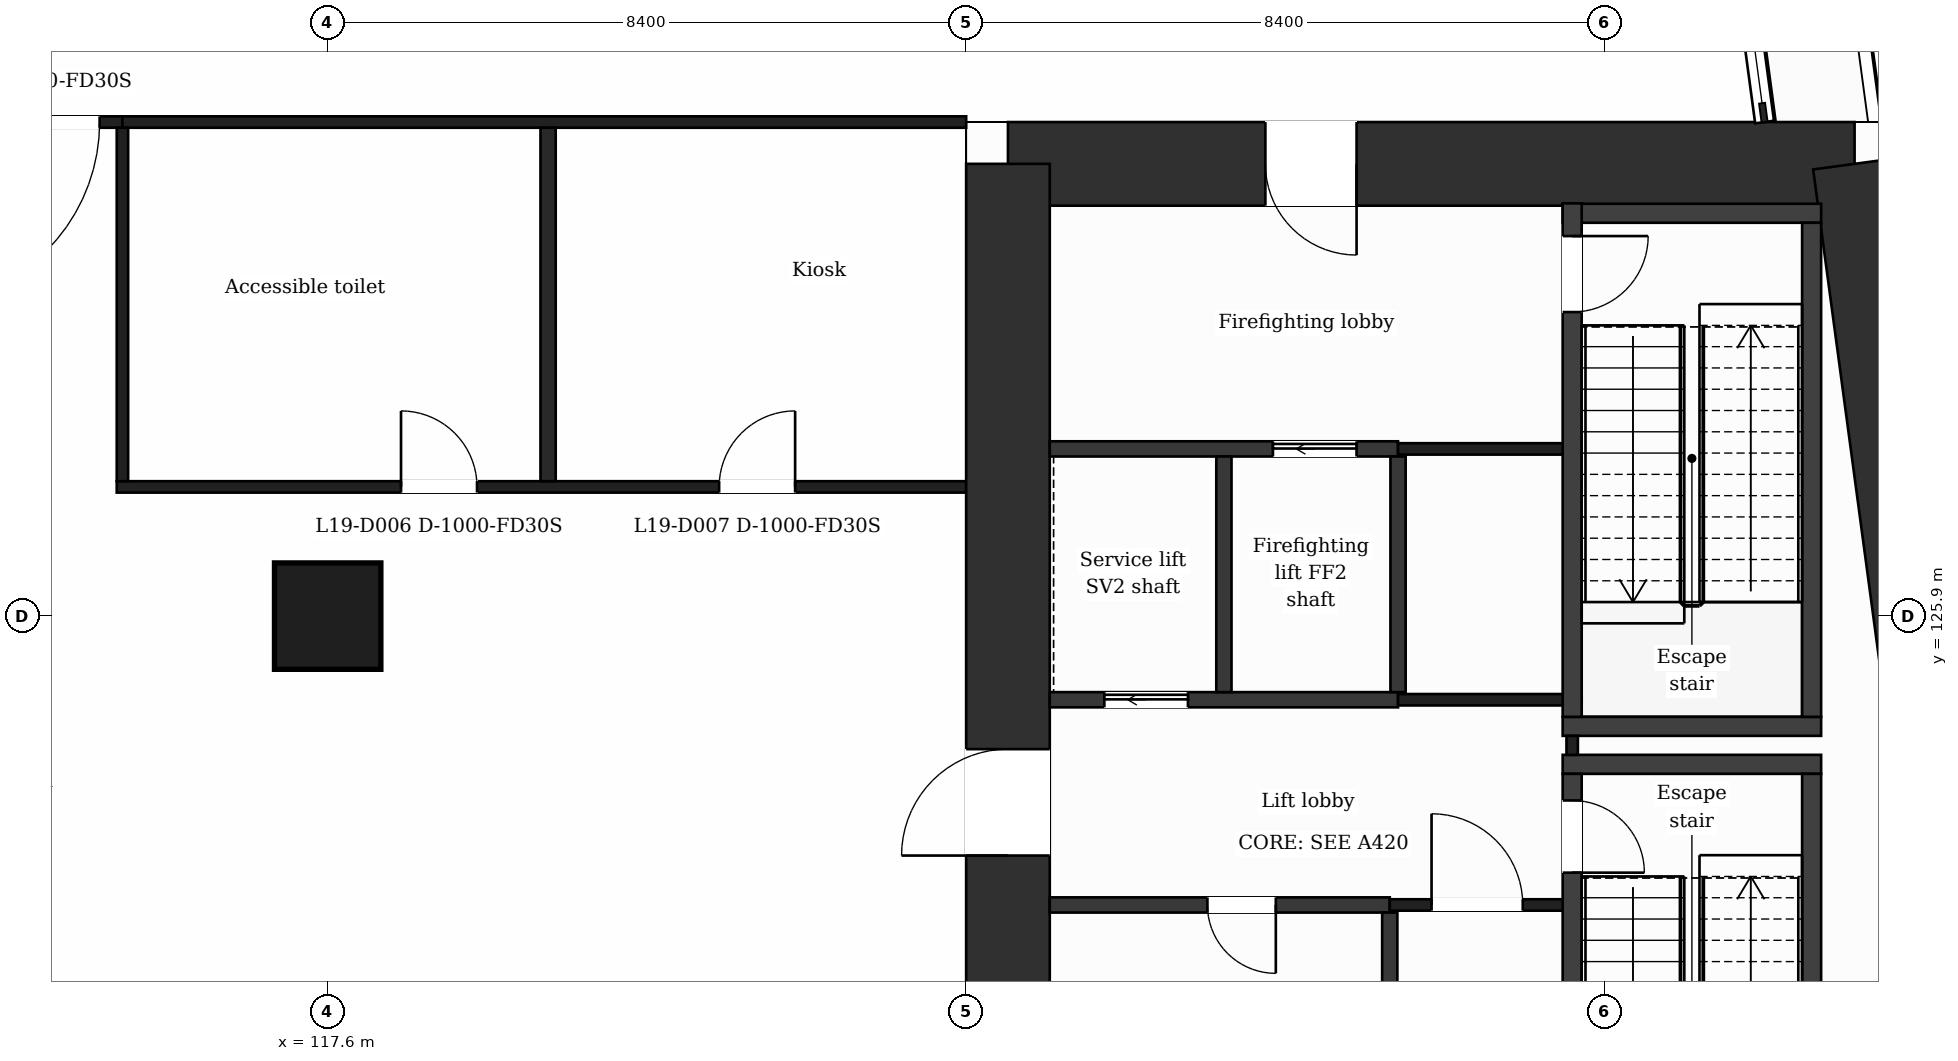
"""IFC4 building model, lengths in metres.
Left out: names, types, materials, properties, quantities, classifications, styles, units other than length and angle.
Written with IfcOpenShell. Run it as: python <this file> out.ifc"""

import sys

from ifc_helpers import new_model, si_unit, direction, frame, frame_2d, origin, origin_2d, place, context, subcontext, project, spatial, rectangle, extrude, element, fill, save


model = new_model("IFC4")
c1 = context("Model", 3, precision=1e-05, world=origin(), true_north=direction((0.0, 1.0)))
c2 = subcontext(c1, "Body", "Model", "MODEL_VIEW")
j1 = project(units=[si_unit("LENGTHUNIT", "METRE"), si_unit("PLANEANGLEUNIT", "RADIAN")], contexts=[c1])
p1 = place(None, origin())
s1 = spatial("IfcSite", under=j1, at=p1, CompositionType="ELEMENT")
p2 = place(p1, origin())
s2 = spatial("IfcBuilding", under=s1, at=p2, CompositionType="ELEMENT")
p3 = place(p2, frame((0.0, 0.0, 86.0)))
s3 = spatial("IfcBuildingStorey", under=s2, at=p3, CompositionType="ELEMENT", Elevation=86.0)
p4 = place(p3, frame((126.55, 131.85, 0.0), z_axis=(0.0, 0.0, 1.0), x_axis=(1.0, 0.0, 0.0)))
e1 = element("IfcWall", 1, at=p4, inside=s3, PredefinedType="SHEAR", context=c2, shape_type="SweptSolid", body=[
    extrude(rectangle(XDim=11.138, YDim=1.1, at=frame_2d((5.569, 0.0))), origin(), (0.0, 0.0, 1.0), 5.0),
])
p5 = place(p4, frame((3.386, 0.0, 0.0)))
e2 = element("IfcOpeningElement", 2, at=p5, cuts=e1, PredefinedType="OPENING", context=c2, shape_type="SweptSolid", body=[
    extrude(rectangle(XDim=1.2, YDim=2.1, at=frame_2d((0.6, 1.05))), frame((0.0, 0.56, 0.0), z_axis=(0.0, -1.0, 0.0), x_axis=(1.0, 0.0, 0.0)), (0.0, 0.0, 1.0), 1.12),
])
p6 = place(p3, frame((137.688, 131.85, 0.0), z_axis=(0.0, 0.0, 1.0), x_axis=(0.133411793472, -0.991060691059, 0.0)))
e3 = element("IfcWall", 3, at=p6, inside=s3, PredefinedType="SHEAR", context=c2, shape_type="SweptSolid", body=[
    extrude(rectangle(XDim=21.089, YDim=1.1, at=frame_2d((10.544, 0.0))), origin(), (0.0, 0.0, 1.0), 5.0),
])
p7 = place(p3, frame((126.55, 110.95, 0.0), z_axis=(0.0, 0.0, 1.0), x_axis=(0.0, 1.0, 0.0)))
e4 = element("IfcWall", 4, at=p7, inside=s3, PredefinedType="SHEAR", context=c2, shape_type="SweptSolid", body=[
    extrude(rectangle(XDim=20.9, YDim=1.1, at=frame_2d((10.45, 0.0))), origin(), (0.0, 0.0, 1.0), 5.0),
])
p8 = place(p7, frame((11.8, 0.0, 0.0)))
e5 = element("IfcOpeningElement", 5, at=p8, cuts=e4, PredefinedType="OPENING", context=c2, shape_type="SweptSolid", body=[
    extrude(rectangle(XDim=1.4, YDim=2.1, at=frame_2d((0.7, 1.05))), frame((0.0, 0.56, 0.0), z_axis=(0.0, -1.0, 0.0), x_axis=(1.0, 0.0, 0.0)), (0.0, 0.0, 1.0), 1.12),
])
p9 = place(p3, frame((117.6, 125.9, 0.0), z_axis=(0.0, 0.0, 1.0), x_axis=(1.0, 0.0, 0.0)))
e6 = element("IfcColumn", 6, at=p9, inside=s3, PredefinedType="COLUMN", context=c2, shape_type="SweptSolid", body=[
    extrude(rectangle(XDim=1.4, YDim=1.4, at=origin_2d()), origin(), (0.0, 0.0, 1.0), 5.0),
])
p10 = place(p3, frame((127.1, 122.1, 0.0), z_axis=(0.0, 0.0, 1.0), x_axis=(1.0, 0.0, 0.0)))
e7 = element("IfcWall", 7, at=p10, inside=s3, PredefinedType="PARTITIONING", context=c2, shape_type="SweptSolid", body=[
    extrude(rectangle(XDim=4.473, YDim=0.2, at=frame_2d((2.236, 0.0))), origin(), (0.0, 0.0, 1.0), 4.68),
])
p11 = place(p10, frame((2.074, 0.0, 0.0)))
e8 = element("IfcOpeningElement", 8, at=p11, cuts=e7, PredefinedType="OPENING", context=c2, shape_type="SweptSolid", body=[
    extrude(rectangle(XDim=0.9, YDim=2.1, at=frame_2d((0.45, 1.05))), frame((0.0, 0.11, 0.0), z_axis=(0.0, -1.0, 0.0), x_axis=(1.0, 0.0, 0.0)), (0.0, 0.0, 1.0), 0.22),
])
p12 = place(p3, frame((131.573, 122.1, 0.0), z_axis=(0.0, 0.0, 1.0), x_axis=(1.0, 0.0, 0.0)))
e9 = element("IfcWall", 9, at=p12, inside=s3, PredefinedType="PARTITIONING", context=c2, shape_type="SweptSolid", body=[
    extrude(rectangle(XDim=2.4, YDim=0.15, at=frame_2d((1.2, 0.0))), origin(), (0.0, 0.0, 1.0), 4.68),
])
p13 = place(p12, frame((0.55, 0.0, 0.0)))
e10 = element("IfcOpeningElement", 10, at=p13, cuts=e9, PredefinedType="OPENING", context=c2, shape_type="SweptSolid", body=[
    extrude(rectangle(XDim=1.2, YDim=2.1, at=frame_2d((0.6, 1.05))), frame((0.0, 0.085, 0.0), z_axis=(0.0, -1.0, 0.0), x_axis=(1.0, 0.0, 0.0)), (0.0, 0.0, 1.0), 0.17),
])
for number, where, z_axis, x_axis in (
    (11, (133.848, 123.95, 0.0), (0.0, 0.0, 1.0), (1.0, 0.0, 0.0)),
    (12, (133.848, 124.45, 0.0), (0.0, 0.0, 1.0), (1.0, 0.0, 0.0)),
):
    element("IfcWall", number, at=place(p3, frame(where, z_axis=z_axis, x_axis=x_axis)), inside=s3, PredefinedType="PARTITIONING", context=c2, shape_type="SweptSolid", body=[
        extrude(rectangle(XDim=3.4, YDim=0.25, at=frame_2d((1.7, 0.0))), origin(), (0.0, 0.0, 1.0), 4.68),
    ])
p14 = place(p3, frame((127.1, 124.8, 0.0), z_axis=(0.0, 0.0, 1.0), x_axis=(1.0, 0.0, 0.0)))
e13 = element("IfcWall", 13, at=p14, inside=s3, PredefinedType="PARTITIONING", context=c2, shape_type="SweptSolid", body=[
    extrude(rectangle(XDim=4.582, YDim=0.2, at=frame_2d((2.291, 0.0))), origin(), (0.0, 0.0, 1.0), 4.68),
])
p15 = place(p14, frame((0.718, 0.0, 0.0)))
e14 = element("IfcOpeningElement", 14, at=p15, cuts=e13, PredefinedType="OPENING", context=c2, shape_type="SweptSolid", body=[
    extrude(rectangle(XDim=1.1, YDim=2.1, at=frame_2d((0.55, 1.05))), frame((0.0, 0.11, 0.0), z_axis=(0.0, -1.0, 0.0), x_axis=(1.0, 0.0, 0.0)), (0.0, 0.0, 1.0), 0.22),
])
p16 = place(p3, frame((131.682, 124.8, 0.0), z_axis=(0.0, 0.0, 1.0), x_axis=(1.0, 0.0, 0.0)))
e15 = element("IfcWall", 15, at=p16, inside=s3, PredefinedType="PARTITIONING", context=c2, shape_type="SweptSolid", body=[
    extrude(rectangle(XDim=2.416, YDim=0.15, at=frame_2d((1.208, 0.0))), origin(), (0.0, 0.0, 1.0), 4.68),
])
p17 = place(p3, frame((114.825, 127.6, 0.0), z_axis=(0.0, 0.0, 1.0), x_axis=(1.0, 0.0, 0.0)))
e16 = element("IfcWall", 16, at=p17, inside=s3, PredefinedType="PARTITIONING", context=c2, shape_type="SweptSolid", body=[
    extrude(rectangle(XDim=11.175, YDim=0.15, at=frame_2d((5.587, 0.0))), origin(), (0.0, 0.0, 1.0), 4.68),
])
p18 = place(p17, frame((3.74, 0.0, 0.0)))
e17 = element("IfcOpeningElement", 17, at=p18, cuts=e16, PredefinedType="OPENING", context=c2, shape_type="SweptSolid", body=[
    extrude(rectangle(XDim=1.0, YDim=2.1, at=frame_2d((0.5, 1.05))), frame((0.0, 0.085, 0.0), z_axis=(0.0, -1.0, 0.0), x_axis=(1.0, 0.0, 0.0)), (0.0, 0.0, 1.0), 0.17),
])
p19 = place(p17, frame((7.925, 0.0, 0.0)))
e18 = element("IfcOpeningElement", 18, at=p19, cuts=e16, PredefinedType="OPENING", context=c2, shape_type="SweptSolid", body=[
    extrude(rectangle(XDim=1.0, YDim=2.1, at=frame_2d((0.5, 1.05))), frame((0.0, 0.085, 0.0), z_axis=(0.0, -1.0, 0.0), x_axis=(1.0, 0.0, 0.0)), (0.0, 0.0, 1.0), 0.17),
])
p20 = place(p3, frame((127.1, 128.1, 0.0), z_axis=(0.0, 0.0, 1.0), x_axis=(1.0, 0.0, 0.0)))
e19 = element("IfcWall", 19, at=p20, inside=s3, PredefinedType="PARTITIONING", context=c2, shape_type="SweptSolid", body=[
    extrude(rectangle(XDim=4.582, YDim=0.2, at=frame_2d((2.291, 0.0))), origin(), (0.0, 0.0, 1.0), 4.68),
])
p21 = place(p20, frame((2.936, 0.0, 0.0)))
e20 = element("IfcOpeningElement", 20, at=p21, cuts=e19, PredefinedType="OPENING", context=c2, shape_type="SweptSolid", body=[
    extrude(rectangle(XDim=1.1, YDim=2.1, at=frame_2d((0.55, 1.05))), frame((0.0, 0.11, 0.0), z_axis=(0.0, -1.0, 0.0), x_axis=(1.0, 0.0, 0.0)), (0.0, 0.0, 1.0), 0.22),
])
p22 = place(p3, frame((131.682, 128.1, 0.0), z_axis=(0.0, 0.0, 1.0), x_axis=(1.0, 0.0, 0.0)))
e21 = element("IfcWall", 21, at=p22, inside=s3, PredefinedType="PARTITIONING", context=c2, shape_type="SweptSolid", body=[
    extrude(rectangle(XDim=2.291, YDim=0.15, at=frame_2d((1.146, 0.0))), origin(), (0.0, 0.0, 1.0), 4.68),
])
p23 = place(p3, frame((133.848, 131.2, 0.0), z_axis=(0.0, 0.0, 1.0), x_axis=(1.0, 0.0, 0.0)))
e22 = element("IfcWall", 22, at=p23, inside=s3, PredefinedType="PARTITIONING", context=c2, shape_type="SweptSolid", body=[
    extrude(rectangle(XDim=3.4, YDim=0.25, at=frame_2d((1.7, 0.0))), origin(), (0.0, 0.0, 1.0), 4.68),
])
p24 = place(p3, frame((111.9, 132.4, 0.0), z_axis=(0.0, 0.0, 1.0), x_axis=(1.0, 0.0, 0.0)))
e23 = element("IfcWall", 23, at=p24, inside=s3, PredefinedType="PARTITIONING", context=c2, shape_type="SweptSolid", body=[
    extrude(rectangle(XDim=3.0, YDim=0.15, at=frame_2d((1.5, 0.0))), origin(), (0.0, 0.0, 1.0), 4.68),
])
p25 = place(p24, frame((0.3, 0.0, 0.0)))
e24 = element("IfcOpeningElement", 24, at=p25, cuts=e23, PredefinedType="OPENING", context=c2, shape_type="SweptSolid", body=[
    extrude(rectangle(XDim=2.4, YDim=2.1, at=frame_2d((1.2, 1.05))), frame((0.0, 0.085, 0.0), z_axis=(0.0, -1.0, 0.0), x_axis=(1.0, 0.0, 0.0)), (0.0, 0.0, 1.0), 0.17),
])
p26 = place(p3, frame((114.9, 132.4, 0.0), z_axis=(0.0, 0.0, 1.0), x_axis=(1.0, 0.0, 0.0)))
e25 = element("IfcWall", 25, at=p26, inside=s3, PredefinedType="PARTITIONING", context=c2, shape_type="SweptSolid", body=[
    extrude(rectangle(XDim=11.1, YDim=0.15, at=frame_2d((5.55, 0.0))), origin(), (0.0, 0.0, 1.0), 4.68),
])
p27 = place(p3, frame((114.9, 127.675, 0.0), z_axis=(0.0, 0.0, 1.0), x_axis=(0.0, 1.0, 0.0)))
e26 = element("IfcWall", 26, at=p27, inside=s3, PredefinedType="PARTITIONING", context=c2, shape_type="SweptSolid", body=[
    extrude(rectangle(XDim=4.65, YDim=0.15, at=frame_2d((2.325, 0.0))), origin(), (0.0, 0.0, 1.0), 4.68),
])
p28 = place(p3, frame((120.5, 127.675, 0.0), z_axis=(0.0, 0.0, 1.0), x_axis=(0.0, 1.0, 0.0)))
e27 = element("IfcWall", 27, at=p28, inside=s3, PredefinedType="PARTITIONING", context=c2, shape_type="SweptSolid", body=[
    extrude(rectangle(XDim=4.65, YDim=0.2, at=frame_2d((2.325, 0.0))), origin(), (0.0, 0.0, 1.0), 4.68),
])
p29 = place(p3, frame((129.391, 124.9, 0.0), z_axis=(0.0, 0.0, 1.0), x_axis=(0.0, 1.0, 0.0)))
e28 = element("IfcWall", 28, at=p29, inside=s3, PredefinedType="PARTITIONING", context=c2, shape_type="SweptSolid", body=[
    extrude(rectangle(XDim=3.1, YDim=0.2, at=frame_2d((1.55, 0.0))), origin(), (0.0, 0.0, 1.0), 4.68),
])
p30 = place(p3, frame((131.573, 117.07, 0.0), z_axis=(0.0, 0.0, 1.0), x_axis=(0.0, 1.0, 0.0)))
e29 = element("IfcWall", 29, at=p30, inside=s3, PredefinedType="PARTITIONING", context=c2, shape_type="SweptSolid", body=[
    extrude(rectangle(XDim=4.93, YDim=0.2, at=frame_2d((2.465, 0.0))), origin(), (0.0, 0.0, 1.0), 4.68),
])
p31 = place(p30, frame((0.48, 0.0, 0.0)))
e30 = element("IfcOpeningElement", 30, at=p31, cuts=e29, PredefinedType="OPENING", context=c2, shape_type="SweptSolid", body=[
    extrude(rectangle(XDim=0.9, YDim=2.1, at=frame_2d((0.45, 1.05))), frame((0.0, 0.11, 0.0), z_axis=(0.0, -1.0, 0.0), x_axis=(1.0, 0.0, 0.0)), (0.0, 0.0, 1.0), 0.22),
])
p32 = place(p3, frame((131.682, 124.9, 0.0), z_axis=(0.0, 0.0, 1.0), x_axis=(0.0, 1.0, 0.0)))
e31 = element("IfcWall", 31, at=p32, inside=s3, PredefinedType="PARTITIONING", context=c2, shape_type="SweptSolid", body=[
    extrude(rectangle(XDim=3.1, YDim=0.2, at=frame_2d((1.55, 0.0))), origin(), (0.0, 0.0, 1.0), 4.68),
])
p33 = place(p3, frame((133.973, 124.075, 0.0), z_axis=(0.0, 0.0, 1.0), x_axis=(0.0, 1.0, 0.0)))
e32 = element("IfcWall", 32, at=p33, inside=s3, PredefinedType="PARTITIONING", context=c2, shape_type="SweptSolid", body=[
    extrude(rectangle(XDim=0.25, YDim=0.15, at=frame_2d((0.125, 0.0))), origin(), (0.0, 0.0, 1.0), 4.68),
])
p34 = place(p3, frame((133.973, 117.07, 0.0), z_axis=(0.0, 0.0, 1.0), x_axis=(0.0, 1.0, 0.0)))
e33 = element("IfcWall", 33, at=p34, inside=s3, PredefinedType="PARTITIONING", context=c2, shape_type="SweptSolid", body=[
    extrude(rectangle(XDim=6.755, YDim=0.25, at=frame_2d((3.377, 0.0))), origin(), (0.0, 0.0, 1.0), 4.68),
])
p35 = place(p34, frame((5.455, 0.0, 0.0)))
e34 = element("IfcOpeningElement", 34, at=p35, cuts=e33, PredefinedType="OPENING", context=c2, shape_type="SweptSolid", body=[
    extrude(rectangle(XDim=0.95, YDim=2.1, at=frame_2d((0.475, 1.05))), frame((0.0, 0.135, 0.0), z_axis=(0.0, -1.0, 0.0), x_axis=(1.0, 0.0, 0.0)), (0.0, 0.0, 1.0), 0.27),
])
p36 = place(p3, frame((133.973, 124.575, 0.0), z_axis=(0.0, 0.0, 1.0), x_axis=(0.0, 1.0, 0.0)))
e35 = element("IfcWall", 35, at=p36, inside=s3, PredefinedType="PARTITIONING", context=c2, shape_type="SweptSolid", body=[
    extrude(rectangle(XDim=6.755, YDim=0.25, at=frame_2d((3.377, 0.0))), origin(), (0.0, 0.0, 1.0), 4.68),
])
p37 = place(p36, frame((5.325, 0.0, 0.0)))
e36 = element("IfcOpeningElement", 36, at=p37, cuts=e35, PredefinedType="OPENING", context=c2, shape_type="SweptSolid", body=[
    extrude(rectangle(XDim=1.0, YDim=2.1, at=frame_2d((0.5, 1.05))), frame((0.0, 0.135, 0.0), z_axis=(0.0, -1.0, 0.0), x_axis=(1.0, 0.0, 0.0)), (0.0, 0.0, 1.0), 0.27),
])
p38 = place(p3, frame((137.123, 117.07, 0.0), z_axis=(0.0, 0.0, 1.0), x_axis=(0.0, 1.0, 0.0)))
e37 = element("IfcWall", 37, at=p38, inside=s3, PredefinedType="PARTITIONING", context=c2, shape_type="SweptSolid", body=[
    extrude(rectangle(XDim=6.755, YDim=0.25, at=frame_2d((3.377, 0.0))), origin(), (0.0, 0.0, 1.0), 4.68),
])
p39 = place(p3, frame((137.123, 124.575, 0.0), z_axis=(0.0, 0.0, 1.0), x_axis=(0.0, 1.0, 0.0)))
e38 = element("IfcWall", 38, at=p39, inside=s3, PredefinedType="PARTITIONING", context=c2, shape_type="SweptSolid", body=[
    extrude(rectangle(XDim=6.5, YDim=0.25, at=frame_2d((3.25, 0.0))), origin(), (0.0, 0.0, 1.0), 4.68),
])
p40 = place(p25, origin())
e39 = element("IfcDoor", 39, at=p40, inside=s3, OperationType="SINGLE_SWING_LEFT", PredefinedType="DOOR", context=c2, shape_type="SweptSolid", body=[
    extrude(rectangle(XDim=2.4, YDim=2.1, at=frame_2d((1.2, 1.05))), frame((0.0, 0.025, 0.0), z_axis=(0.0, -1.0, 0.0), x_axis=(1.0, 0.0, 0.0)), (0.0, 0.0, 1.0), 0.05),
])
fill(e24, e39)
p41 = place(p18, origin())
e40 = element("IfcDoor", 40, at=p41, inside=s3, OperationType="SINGLE_SWING_LEFT", PredefinedType="DOOR", context=c2, shape_type="SweptSolid", body=[
    extrude(rectangle(XDim=1.0, YDim=2.1, at=frame_2d((0.5, 1.05))), frame((0.0, 0.025, 0.0), z_axis=(0.0, -1.0, 0.0), x_axis=(1.0, 0.0, 0.0)), (0.0, 0.0, 1.0), 0.05),
])
fill(e17, e40)
p42 = place(p19, origin())
e41 = element("IfcDoor", 41, at=p42, inside=s3, OperationType="SINGLE_SWING_RIGHT", PredefinedType="DOOR", context=c2, shape_type="SweptSolid", body=[
    extrude(rectangle(XDim=1.0, YDim=2.1, at=frame_2d((0.5, 1.05))), frame((0.0, 0.025, 0.0), z_axis=(0.0, -1.0, 0.0), x_axis=(1.0, 0.0, 0.0)), (0.0, 0.0, 1.0), 0.05),
])
fill(e18, e41)
p43 = place(p13, origin())
e42 = element("IfcDoor", 42, at=p43, inside=s3, OperationType="SINGLE_SWING_LEFT", PredefinedType="DOOR", context=c2, shape_type="SweptSolid", body=[
    extrude(rectangle(XDim=1.2, YDim=2.1, at=frame_2d((0.6, 1.05))), frame((0.0, 0.025, 0.0), z_axis=(0.0, -1.0, 0.0), x_axis=(1.0, 0.0, 0.0)), (0.0, 0.0, 1.0), 0.05),
])
fill(e10, e42)
p44 = place(p21, origin())
e43 = element("IfcDoor", 43, at=p44, inside=s3, OperationType="SLIDING_TO_LEFT", PredefinedType="DOOR", context=c2, shape_type="SweptSolid", body=[
    extrude(rectangle(XDim=1.1, YDim=2.1, at=frame_2d((0.55, 1.05))), frame((0.0, 0.025, 0.0), z_axis=(0.0, -1.0, 0.0), x_axis=(1.0, 0.0, 0.0)), (0.0, 0.0, 1.0), 0.05),
])
fill(e20, e43)
p45 = place(p15, origin())
e44 = element("IfcDoor", 44, at=p45, inside=s3, OperationType="SLIDING_TO_LEFT", PredefinedType="DOOR", context=c2, shape_type="SweptSolid", body=[
    extrude(rectangle(XDim=1.1, YDim=2.1, at=frame_2d((0.55, 1.05))), frame((0.0, 0.025, 0.0), z_axis=(0.0, -1.0, 0.0), x_axis=(1.0, 0.0, 0.0)), (0.0, 0.0, 1.0), 0.05),
])
fill(e14, e44)
p46 = place(p11, origin())
e45 = element("IfcDoor", 45, at=p46, inside=s3, OperationType="SINGLE_SWING_RIGHT", PredefinedType="DOOR", context=c2, shape_type="SweptSolid", body=[
    extrude(rectangle(XDim=0.9, YDim=2.1, at=frame_2d((0.45, 1.05))), frame((0.0, 0.025, 0.0), z_axis=(0.0, -1.0, 0.0), x_axis=(1.0, 0.0, 0.0)), (0.0, 0.0, 1.0), 0.05),
])
fill(e8, e45)
p47 = place(p35, origin())
e46 = element("IfcDoor", 46, at=p47, inside=s3, OperationType="SINGLE_SWING_LEFT", PredefinedType="DOOR", context=c2, shape_type="SweptSolid", body=[
    extrude(rectangle(XDim=0.95, YDim=2.1, at=frame_2d((0.475, 1.05))), frame((0.0, 0.025, 0.0), z_axis=(0.0, -1.0, 0.0), x_axis=(1.0, 0.0, 0.0)), (0.0, 0.0, 1.0), 0.05),
])
fill(e34, e46)
p48 = place(p37, origin())
e47 = element("IfcDoor", 47, at=p48, inside=s3, OperationType="SINGLE_SWING_RIGHT", PredefinedType="DOOR", context=c2, shape_type="SweptSolid", body=[
    extrude(rectangle(XDim=1.0, YDim=2.1, at=frame_2d((0.5, 1.05))), frame((0.0, 0.025, 0.0), z_axis=(0.0, -1.0, 0.0), x_axis=(1.0, 0.0, 0.0)), (0.0, 0.0, 1.0), 0.05),
])
fill(e36, e47)
p49 = place(p5, origin())
e48 = element("IfcDoor", 48, at=p49, inside=s3, OperationType="SINGLE_SWING_RIGHT", PredefinedType="DOOR", context=c2, shape_type="SweptSolid", body=[
    extrude(rectangle(XDim=1.2, YDim=2.1, at=frame_2d((0.6, 1.05))), frame((0.0, 0.025, 0.0), z_axis=(0.0, -1.0, 0.0), x_axis=(1.0, 0.0, 0.0)), (0.0, 0.0, 1.0), 0.05),
])
fill(e2, e48)
p50 = place(p8, origin())
e49 = element("IfcDoor", 49, at=p50, inside=s3, OperationType="SINGLE_SWING_LEFT", PredefinedType="DOOR", context=c2, shape_type="SweptSolid", body=[
    extrude(rectangle(XDim=1.4, YDim=2.1, at=frame_2d((0.7, 1.05))), frame((0.0, 0.025, 0.0), z_axis=(0.0, -1.0, 0.0), x_axis=(1.0, 0.0, 0.0)), (0.0, 0.0, 1.0), 0.05),
])
fill(e5, e49)
save(model, sys.argv[1])
